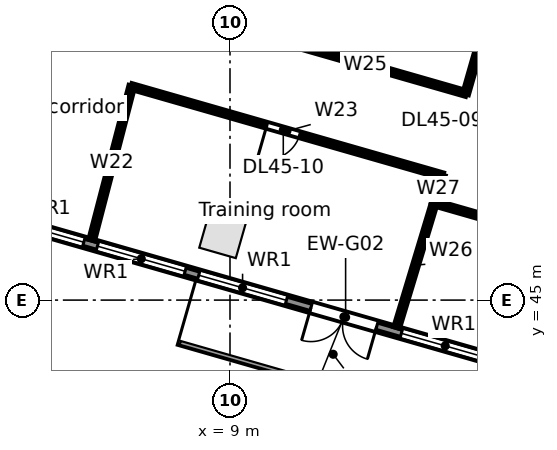
"""IFC4 building model, lengths in metres.
Left out: names, types, materials, properties, quantities, classifications, styles, units other than length and angle.
Written with IfcOpenShell. Run it as: python <this file> out.ifc"""

import sys

from ifc_helpers import new_model, si_unit, direction, frame, frame_2d, origin, origin_2d, place, context, subcontext, project, spatial, rectangle, extrude, element, fill, save


model = new_model("IFC4")
c1 = context("Model", 3, precision=1e-05, world=origin(), true_north=direction((0.0, 1.0)))
c2 = subcontext(c1, "Body", "Model", "MODEL_VIEW")
j1 = project(units=[si_unit("LENGTHUNIT", "METRE"), si_unit("PLANEANGLEUNIT", "RADIAN")], contexts=[c1])
p1 = place(None, origin())
s1 = spatial("IfcSite", under=j1, at=p1, CompositionType="ELEMENT")
p2 = place(p1, origin())
s2 = spatial("IfcBuilding", under=s1, at=p2, CompositionType="ELEMENT")
p3 = place(p2, frame((0.0, 0.0, 211.4)))
s3 = spatial("IfcBuildingStorey", under=s2, at=p3, CompositionType="ELEMENT", Elevation=211.4)
p4 = place(p3, frame((8.81, 46.722, 0.0), z_axis=(0.0, 0.0, 1.0), x_axis=(0.961261695938, -0.275637355817, 0.0)))
e1 = element("IfcColumn", 1, at=p4, inside=s3, PredefinedType="COLUMN", context=c2, shape_type="SweptSolid", body=[
    extrude(rectangle(XDim=1.0, YDim=1.0, at=origin_2d()), origin(), (0.0, 0.0, 1.0), 3.9),
])
p5 = place(p3, frame((24.034, 41.108, 0.0), z_axis=(0.0, 0.0, 1.0), x_axis=(-0.96126060691, 0.275641153683, 0.0)))
e2 = element("IfcWall", 2, at=p5, inside=s3, PredefinedType="STANDARD", context=c2, shape_type="SweptSolid", body=[
    extrude(rectangle(XDim=24.951, YDim=0.25, at=frame_2d((12.475, 0.0))), origin(), (0.0, 0.0, 1.0), 3.62),
])
p6 = place(p5, frame((22.416, 0.0, 0.8)))
e3 = element("IfcOpeningElement", 3, at=p6, cuts=e2, PredefinedType="OPENING", context=c2, shape_type="SweptSolid", body=[
    extrude(rectangle(XDim=2.4, YDim=2.2, at=frame_2d((1.2, 1.1))), frame((0.0, 0.135, 0.0), z_axis=(0.0, -1.0, 0.0), x_axis=(1.0, 0.0, 0.0)), (0.0, 0.0, 1.0), 0.27),
])
p7 = place(p5, frame((19.643, 0.0, 0.8)))
e4 = element("IfcOpeningElement", 4, at=p7, cuts=e2, PredefinedType="OPENING", context=c2, shape_type="SweptSolid", body=[
    extrude(rectangle(XDim=2.4, YDim=2.2, at=frame_2d((1.2, 1.1))), frame((0.0, 0.135, 0.0), z_axis=(0.0, -1.0, 0.0), x_axis=(1.0, 0.0, 0.0)), (0.0, 0.0, 1.0), 0.27),
])
p8 = place(p5, frame((16.869, 0.0, 0.8)))
e5 = element("IfcOpeningElement", 5, at=p8, cuts=e2, PredefinedType="OPENING", context=c2, shape_type="SweptSolid", body=[
    extrude(rectangle(XDim=2.4, YDim=2.2, at=frame_2d((1.2, 1.1))), frame((0.0, 0.135, 0.0), z_axis=(0.0, -1.0, 0.0), x_axis=(1.0, 0.0, 0.0)), (0.0, 0.0, 1.0), 0.27),
])
p9 = place(p5, frame((14.096, 0.0, 0.8)))
e6 = element("IfcOpeningElement", 6, at=p9, cuts=e2, PredefinedType="OPENING", context=c2, shape_type="SweptSolid", body=[
    extrude(rectangle(XDim=2.4, YDim=2.2, at=frame_2d((1.2, 1.1))), frame((0.0, 0.135, 0.0), z_axis=(0.0, -1.0, 0.0), x_axis=(1.0, 0.0, 0.0)), (0.0, 0.0, 1.0), 0.27),
])
p10 = place(p5, frame((11.622, 0.0, 0.0)))
e7 = element("IfcOpeningElement", 7, at=p10, cuts=e2, PredefinedType="OPENING", context=c2, shape_type="SweptSolid", body=[
    extrude(rectangle(XDim=1.8, YDim=2.4, at=frame_2d((0.9, 1.2))), frame((0.0, 0.135, 0.0), z_axis=(0.0, -1.0, 0.0), x_axis=(1.0, 0.0, 0.0)), (0.0, 0.0, 1.0), 0.27),
])
p11 = place(p5, frame((8.549, 0.0, 0.8)))
e8 = element("IfcOpeningElement", 8, at=p11, cuts=e2, PredefinedType="OPENING", context=c2, shape_type="SweptSolid", body=[
    extrude(rectangle(XDim=2.4, YDim=2.2, at=frame_2d((1.2, 1.1))), frame((0.0, 0.135, 0.0), z_axis=(0.0, -1.0, 0.0), x_axis=(1.0, 0.0, 0.0)), (0.0, 0.0, 1.0), 0.27),
])
p12 = place(p5, frame((5.775, 0.0, 0.8)))
e9 = element("IfcOpeningElement", 9, at=p12, cuts=e2, PredefinedType="OPENING", context=c2, shape_type="SweptSolid", body=[
    extrude(rectangle(XDim=2.4, YDim=2.2, at=frame_2d((1.2, 1.1))), frame((0.0, 0.135, 0.0), z_axis=(0.0, -1.0, 0.0), x_axis=(1.0, 0.0, 0.0)), (0.0, 0.0, 1.0), 0.27),
])
p13 = place(p5, frame((3.302, 0.0, 0.0)))
e10 = element("IfcOpeningElement", 10, at=p13, cuts=e2, PredefinedType="OPENING", context=c2, shape_type="SweptSolid", body=[
    extrude(rectangle(XDim=1.8, YDim=2.4, at=frame_2d((0.9, 1.2))), frame((0.0, 0.135, 0.0), z_axis=(0.0, -1.0, 0.0), x_axis=(1.0, 0.0, 0.0)), (0.0, 0.0, 1.0), 0.27),
])
p14 = place(p5, frame((0.229, 0.0, 0.8)))
e11 = element("IfcOpeningElement", 11, at=p14, cuts=e2, PredefinedType="OPENING", context=c2, shape_type="SweptSolid", body=[
    extrude(rectangle(XDim=2.4, YDim=2.2, at=frame_2d((1.2, 1.1))), frame((0.0, 0.135, 0.0), z_axis=(0.0, -1.0, 0.0), x_axis=(1.0, 0.0, 0.0)), (0.0, 0.0, 1.0), 0.27),
])
p15 = place(p3, frame((5.364, 46.592, 0.0), z_axis=(0.0, 0.0, 1.0), x_axis=(0.25210423577, 0.967700084895, 0.0)))
e12 = element("IfcWall", 12, at=p15, inside=s3, PredefinedType="PARTITIONING", context=c2, shape_type="SweptSolid", body=[
    extrude(rectangle(XDim=4.161, YDim=0.125, at=frame_2d((2.081, 0.0))), origin(), (0.0, 0.0, 1.0), 2.988),
])
p16 = place(p3, frame((6.413, 50.619, 0.0), z_axis=(0.0, 0.0, 1.0), x_axis=(0.961251402136, -0.275673252041, 0.0)))
e13 = element("IfcWall", 13, at=p16, inside=s3, PredefinedType="PARTITIONING", context=c2, shape_type="SweptSolid", body=[
    extrude(rectangle(XDim=8.499, YDim=0.125, at=frame_2d((4.25, 0.0))), origin(), (0.0, 0.0, 1.0), 2.8),
])
p17 = place(p16, frame((3.7, 0.0, 0.0)))
e14 = element("IfcOpeningElement", 14, at=p17, cuts=e13, PredefinedType="OPENING", context=c2, shape_type="SweptSolid", body=[
    extrude(rectangle(XDim=0.9, YDim=2.1, at=frame_2d((0.45, 1.05))), frame((0.0, 0.073, 0.0), z_axis=(0.0, -1.0, 0.0), x_axis=(1.0, 0.0, 0.0)), (0.0, 0.0, 1.0), 0.145),
])
p18 = place(p3, frame((9.917, 51.955, 0.0), z_axis=(0.0, 0.0, 1.0), x_axis=(0.961258850611, -0.275647278458, 0.0)))
e15 = element("IfcWall", 15, at=p18, inside=s3, PredefinedType="PARTITIONING", context=c2, shape_type="SweptSolid", body=[
    extrude(rectangle(XDim=5.5, YDim=0.125, at=frame_2d((2.75, 0.0))), origin(), (0.0, 0.0, 1.0), 2.8),
])
p19 = place(p3, frame((13.39, 44.29, 0.0), z_axis=(0.0, 0.0, 1.0), x_axis=(0.289389501276, 0.957211427299, 0.0)))
e16 = element("IfcWall", 16, at=p19, inside=s3, PredefinedType="PARTITIONING", context=c2, shape_type="SweptSolid", body=[
    extrude(rectangle(XDim=3.411, YDim=0.125, at=frame_2d((1.706, 0.0))), origin(), (0.0, 0.0, 1.0), 2.994),
])
p20 = place(p3, frame((14.377, 47.555, 0.0), z_axis=(0.0, 0.0, 1.0), x_axis=(0.274807134575, 0.961499370144, 0.0)))
e17 = element("IfcWall", 17, at=p20, inside=s3, PredefinedType="PARTITIONING", context=c2, shape_type="SweptSolid", body=[
    extrude(rectangle(XDim=0.75, YDim=0.125, at=frame_2d((0.375, 0.0))), origin(), (0.0, 0.0, 1.0), 3.62),
])
p21 = place(p3, frame((14.377, 47.555, 0.0), z_axis=(0.0, 0.0, 1.0), x_axis=(0.961263044958, -0.275632651182, 0.0)))
e18 = element("IfcWall", 18, at=p21, inside=s3, PredefinedType="PARTITIONING", context=c2, shape_type="SweptSolid", body=[
    extrude(rectangle(XDim=11.0, YDim=0.125, at=frame_2d((5.5, 0.0))), origin(), (0.0, 0.0, 1.0), 2.9),
])
p22 = place(p21, frame((4.95, 0.0, 0.0)))
e19 = element("IfcOpeningElement", 19, at=p22, cuts=e18, PredefinedType="OPENING", context=c2, shape_type="SweptSolid", body=[
    extrude(rectangle(XDim=0.9, YDim=2.1, at=frame_2d((0.45, 1.05))), frame((0.0, 0.073, 0.0), z_axis=(0.0, -1.0, 0.0), x_axis=(1.0, 0.0, 0.0)), (0.0, 0.0, 1.0), 0.145),
])
p23 = place(p3, frame((15.204, 50.439, 0.0), z_axis=(0.0, 0.0, 1.0), x_axis=(0.275505760599, 0.961299420512, 0.0)))
e20 = element("IfcWall", 20, at=p23, inside=s3, PredefinedType="PARTITIONING", context=c2, shape_type="SweptSolid", body=[
    extrude(rectangle(XDim=5.999, YDim=0.125, at=frame_2d((3.0, 0.0))), origin(), (0.0, 0.0, 1.0), 2.8),
])
p24 = place(p23, frame((2.45, 0.0, 0.0)))
e21 = element("IfcOpeningElement", 21, at=p24, cuts=e20, PredefinedType="OPENING", context=c2, shape_type="SweptSolid", body=[
    extrude(rectangle(XDim=0.9, YDim=2.1, at=frame_2d((0.45, 1.05))), frame((0.0, 0.073, 0.0), z_axis=(0.0, -1.0, 0.0), x_axis=(1.0, 0.0, 0.0)), (0.0, 0.0, 1.0), 0.145),
])
p25 = place(p7, origin())
e22 = element("IfcWindow", 22, at=p25, inside=s3, PartitioningType="SINGLE_PANEL", PredefinedType="WINDOW", context=c2, shape_type="SweptSolid", body=[
    extrude(rectangle(XDim=2.4, YDim=2.2, at=frame_2d((1.2, 1.1))), frame((0.0, 0.03, 0.0), z_axis=(0.0, -1.0, 0.0), x_axis=(1.0, 0.0, 0.0)), (0.0, 0.0, 1.0), 0.06),
])
fill(e4, e22)
p26 = place(p8, origin())
e23 = element("IfcWindow", 23, at=p26, inside=s3, PartitioningType="SINGLE_PANEL", PredefinedType="WINDOW", context=c2, shape_type="SweptSolid", body=[
    extrude(rectangle(XDim=2.4, YDim=2.2, at=frame_2d((1.2, 1.1))), frame((0.0, 0.03, 0.0), z_axis=(0.0, -1.0, 0.0), x_axis=(1.0, 0.0, 0.0)), (0.0, 0.0, 1.0), 0.06),
])
fill(e5, e23)
p27 = place(p9, origin())
e24 = element("IfcWindow", 24, at=p27, inside=s3, PartitioningType="SINGLE_PANEL", PredefinedType="WINDOW", context=c2, shape_type="SweptSolid", body=[
    extrude(rectangle(XDim=2.4, YDim=2.2, at=frame_2d((1.2, 1.1))), frame((0.0, 0.03, 0.0), z_axis=(0.0, -1.0, 0.0), x_axis=(1.0, 0.0, 0.0)), (0.0, 0.0, 1.0), 0.06),
])
fill(e6, e24)
p28 = place(p10, origin())
e25 = element("IfcDoor", 25, at=p28, inside=s3, OperationType="DOUBLE_DOOR_SINGLE_SWING", PredefinedType="DOOR", context=c2, shape_type="SweptSolid", body=[
    extrude(rectangle(XDim=1.8, YDim=2.4, at=frame_2d((0.9, 1.2))), frame((0.0, 0.025, 0.0), z_axis=(0.0, -1.0, 0.0), x_axis=(1.0, 0.0, 0.0)), (0.0, 0.0, 1.0), 0.05),
])
fill(e7, e25)
p29 = place(p11, origin())
e26 = element("IfcWindow", 26, at=p29, inside=s3, PartitioningType="SINGLE_PANEL", PredefinedType="WINDOW", context=c2, shape_type="SweptSolid", body=[
    extrude(rectangle(XDim=2.4, YDim=2.2, at=frame_2d((1.2, 1.1))), frame((0.0, 0.03, 0.0), z_axis=(0.0, -1.0, 0.0), x_axis=(1.0, 0.0, 0.0)), (0.0, 0.0, 1.0), 0.06),
])
fill(e8, e26)
p30 = place(p17, frame((0.9, 0.0, 0.0), z_axis=(0.0, 0.0, 1.0), x_axis=(-1.0, 0.0, 0.0)))
e27 = element("IfcDoor", 27, at=p30, inside=s3, OperationType="SINGLE_SWING_RIGHT", PredefinedType="DOOR", context=c2, shape_type="SweptSolid", body=[
    extrude(rectangle(XDim=0.9, YDim=2.1, at=frame_2d((0.45, 1.05))), frame((0.0, 0.025, 0.0), z_axis=(0.0, -1.0, 0.0), x_axis=(1.0, 0.0, 0.0)), (0.0, 0.0, 1.0), 0.05),
])
fill(e14, e27)
save(model, sys.argv[1])
